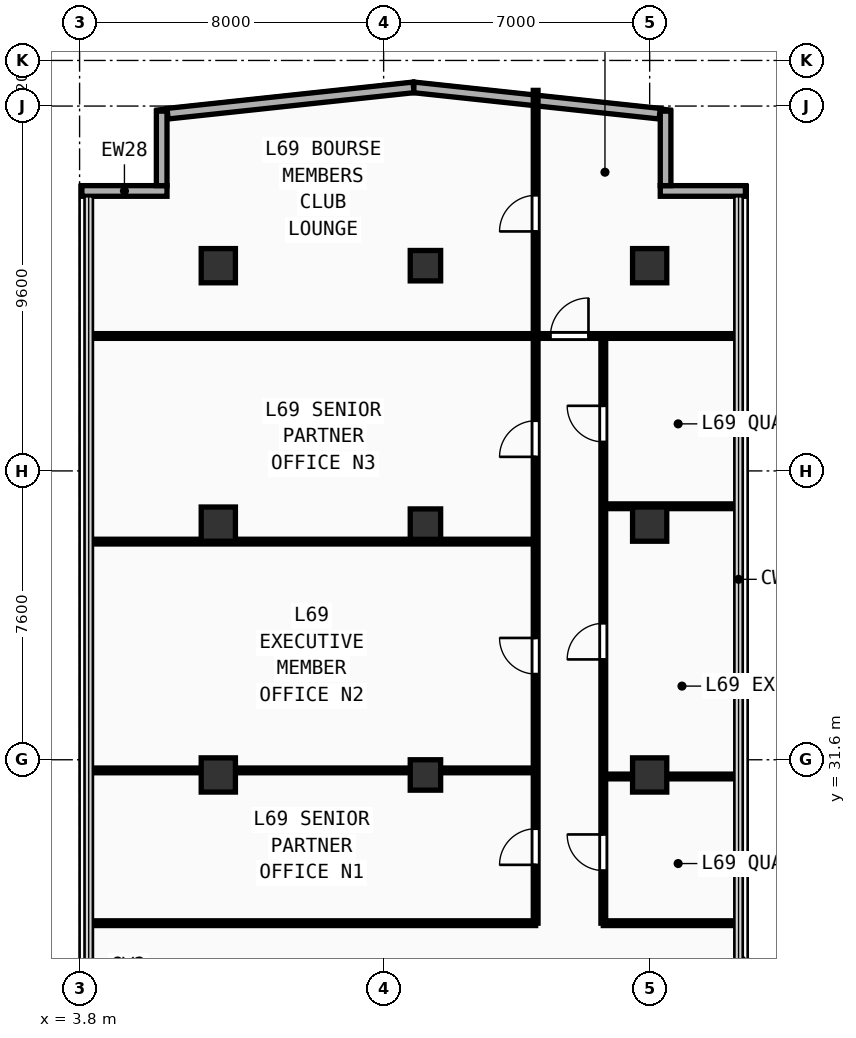
"""IFC4 building model, lengths in metres.
Left out: names, types, materials, properties, quantities, classifications, styles, units other than length and angle.
Written with IfcOpenShell. Run it as: python <this file> out.ifc"""

import sys

from ifc_helpers import new_model, si_unit, direction, frame, frame_2d, origin, origin_2d, place, context, subcontext, project, spatial, rectangle, extrude, element, fill, save


model = new_model("IFC4")
c1 = context("Model", 3, precision=1e-05, world=origin(), true_north=direction((0.0, 1.0)))
c2 = subcontext(c1, "Body", "Model", "MODEL_VIEW")
j1 = project(units=[si_unit("LENGTHUNIT", "METRE"), si_unit("PLANEANGLEUNIT", "RADIAN")], contexts=[c1])
p1 = place(None, origin())
s1 = spatial("IfcSite", under=j1, at=p1, CompositionType="ELEMENT")
p2 = place(p1, origin())
s2 = spatial("IfcBuilding", under=s1, at=p2, CompositionType="ELEMENT")
p3 = place(p2, frame((0.0, 0.0, 270.4)))
s3 = spatial("IfcBuildingStorey", under=s2, at=p3, CompositionType="ELEMENT", Elevation=270.4)
for number, where, z_axis, x_axis in (
    (1, (7.45, 31.2, 0.0), (0.0, 0.0, 1.0), (1.0, 0.0, 0.0)),
    (2, (7.45, 37.8, 0.0), (0.0, 0.0, 1.0), (1.0, 0.0, 0.0)),
    (3, (7.45, 44.6, 0.0), (0.0, 0.0, 1.0), (1.0, 0.0, 0.0)),
    (4, (18.8, 31.2, 0.0), (0.0, 0.0, 1.0), (1.0, 0.0, 0.0)),
    (5, (18.8, 37.8, 0.0), (0.0, 0.0, 1.0), (1.0, 0.0, 0.0)),
    (6, (18.8, 44.6, 0.0), (0.0, 0.0, 1.0), (1.0, 0.0, 0.0)),
):
    element("IfcColumn", number, at=place(p3, frame(where, z_axis=z_axis, x_axis=x_axis)), inside=s3, PredefinedType="COLUMN", context=c2, shape_type="SweptSolid", body=[
        extrude(rectangle(XDim=0.9, YDim=0.9, at=origin_2d()), origin(), (0.0, 0.0, 1.0), 3.56),
    ])
for number, where, z_axis, x_axis in (
    (7, (12.9, 31.2, 0.0), (0.0, 0.0, 1.0), (1.0, 0.0, 0.0)),
    (8, (12.9, 37.8, 0.0), (0.0, 0.0, 1.0), (1.0, 0.0, 0.0)),
    (9, (12.9, 44.6, 0.0), (0.0, 0.0, 1.0), (1.0, 0.0, 0.0)),
):
    element("IfcColumn", number, at=place(p3, frame(where, z_axis=z_axis, x_axis=x_axis)), inside=s3, PredefinedType="COLUMN", context=c2, shape_type="SweptSolid", body=[
        extrude(rectangle(XDim=0.8, YDim=0.8, at=origin_2d()), origin(), (0.0, 0.0, 1.0), 3.56),
    ])
p4 = place(p3, frame((19.079, 46.566, 0.0), z_axis=(0.0, 0.0, 1.0), x_axis=(1.0, 0.0, 0.0)))
e10 = element("IfcWall", 10, at=p4, inside=s3, PredefinedType="SOLIDWALL", context=c2, shape_type="SweptSolid", body=[
    extrude(rectangle(XDim=2.24, YDim=0.28, at=frame_2d((1.12, 0.0))), origin(), (0.0, 0.0, 1.0), 3.56),
])
p5 = place(p3, frame((19.219, 46.706, 0.0), z_axis=(0.0, 0.0, 1.0), x_axis=(0.0, 1.0, 0.0)))
e11 = element("IfcWall", 11, at=p5, inside=s3, PredefinedType="SOLIDWALL", context=c2, shape_type="SweptSolid", body=[
    extrude(rectangle(XDim=1.96, YDim=0.28, at=frame_2d((0.98, 0.0))), origin(), (0.0, 0.0, 1.0), 3.56),
])
p6 = place(p3, frame((3.86, 46.566, 0.0), z_axis=(0.0, 0.0, 1.0), x_axis=(1.0, 0.0, 0.0)))
e12 = element("IfcWall", 12, at=p6, inside=s3, PredefinedType="SOLIDWALL", context=c2, shape_type="SweptSolid", body=[
    extrude(rectangle(XDim=2.24, YDim=0.28, at=frame_2d((1.12, 0.0))), origin(), (0.0, 0.0, 1.0), 3.56),
])
p7 = place(p3, frame((5.96, 46.706, 0.0), z_axis=(0.0, 0.0, 1.0), x_axis=(0.0, 1.0, 0.0)))
e13 = element("IfcWall", 13, at=p7, inside=s3, PredefinedType="SOLIDWALL", context=c2, shape_type="SweptSolid", body=[
    extrude(rectangle(XDim=1.96, YDim=0.28, at=frame_2d((0.98, 0.0))), origin(), (0.0, 0.0, 1.0), 3.56),
])
p8 = place(p3, frame((19.064, 48.599, 0.0), z_axis=(0.0, 0.0, 1.0), x_axis=(-0.994325178593, 0.106383453672, 0.0)))
e14 = element("IfcWall", 14, at=p8, inside=s3, PredefinedType="SOLIDWALL", context=c2, shape_type="SweptSolid", body=[
    extrude(rectangle(XDim=6.508, YDim=0.28, at=frame_2d((3.254, 0.0))), origin(), (0.0, 0.0, 1.0), 3.56),
])
p9 = place(p3, frame((12.586, 49.292, 0.0), z_axis=(0.0, 0.0, 1.0), x_axis=(-0.994324754032, -0.106387421808, 0.0)))
e15 = element("IfcWall", 15, at=p9, inside=s3, PredefinedType="SOLIDWALL", context=c2, shape_type="SweptSolid", body=[
    extrude(rectangle(XDim=6.508, YDim=0.28, at=frame_2d((3.254, 0.0))), origin(), (0.0, 0.0, 1.0), 3.56),
])
p10 = place(p3, frame((4.04, 27.3, 0.0), z_axis=(0.0, 0.0, 1.0), x_axis=(1.0, 0.0, 0.0)))
e16 = element("IfcWall", 16, at=p10, inside=s3, PredefinedType="PARTITIONING", context=c2, shape_type="SweptSolid", body=[
    extrude(rectangle(XDim=11.76, YDim=0.125, at=frame_2d((5.88, 0.0))), origin(), (0.0, 0.0, 1.0), 3.56),
])
p11 = place(p3, frame((15.8, 27.3, 0.0), z_axis=(0.0, 0.0, 1.0), x_axis=(0.0, 1.0, 0.0)))
e17 = element("IfcWall", 17, at=p11, inside=s3, PredefinedType="PARTITIONING", context=c2, shape_type="SweptSolid", body=[
    extrude(rectangle(XDim=15.45, YDim=0.125, at=frame_2d((7.725, 0.0))), origin(), (0.0, 0.0, 1.0), 3.56),
])
p12 = place(p11, frame((1.535, 0.0, 0.0)))
e18 = element("IfcOpeningElement", 18, at=p12, cuts=e17, PredefinedType="OPENING", context=c2, shape_type="SweptSolid", body=[
    extrude(rectangle(XDim=0.95, YDim=2.15, at=frame_2d((0.475, 1.075))), frame((0.0, 0.073, 0.0), z_axis=(0.0, -1.0, 0.0), x_axis=(1.0, 0.0, 0.0)), (0.0, 0.0, 1.0), 0.145),
])
p13 = place(p11, frame((6.555, 0.0, 0.0)))
e19 = element("IfcOpeningElement", 19, at=p13, cuts=e17, PredefinedType="OPENING", context=c2, shape_type="SweptSolid", body=[
    extrude(rectangle(XDim=0.95, YDim=2.15, at=frame_2d((0.475, 1.075))), frame((0.0, 0.073, 0.0), z_axis=(0.0, -1.0, 0.0), x_axis=(1.0, 0.0, 0.0)), (0.0, 0.0, 1.0), 0.145),
])
p14 = place(p11, frame((12.27, 0.0, 0.0)))
e20 = element("IfcOpeningElement", 20, at=p14, cuts=e17, PredefinedType="OPENING", context=c2, shape_type="SweptSolid", body=[
    extrude(rectangle(XDim=0.95, YDim=2.15, at=frame_2d((0.475, 1.075))), frame((0.0, 0.073, 0.0), z_axis=(0.0, -1.0, 0.0), x_axis=(1.0, 0.0, 0.0)), (0.0, 0.0, 1.0), 0.145),
])
p15 = place(p3, frame((4.04, 31.32, 0.0), z_axis=(0.0, 0.0, 1.0), x_axis=(1.0, 0.0, 0.0)))
e21 = element("IfcWall", 21, at=p15, inside=s3, PredefinedType="PARTITIONING", context=c2, shape_type="SweptSolid", body=[
    extrude(rectangle(XDim=11.76, YDim=0.125, at=frame_2d((5.88, 0.0))), origin(), (0.0, 0.0, 1.0), 2.798),
])
p16 = place(p3, frame((4.04, 37.34, 0.0), z_axis=(0.0, 0.0, 1.0), x_axis=(1.0, 0.0, 0.0)))
e22 = element("IfcWall", 22, at=p16, inside=s3, PredefinedType="PARTITIONING", context=c2, shape_type="SweptSolid", body=[
    extrude(rectangle(XDim=11.76, YDim=0.125, at=frame_2d((5.88, 0.0))), origin(), (0.0, 0.0, 1.0), 3.56),
])
p17 = place(p3, frame((4.04, 42.75, 0.0), z_axis=(0.0, 0.0, 1.0), x_axis=(1.0, 0.0, 0.0)))
e23 = element("IfcWall", 23, at=p17, inside=s3, PredefinedType="PARTITIONING", context=c2, shape_type="SweptSolid", body=[
    extrude(rectangle(XDim=17.12, YDim=0.125, at=frame_2d((8.56, 0.0))), origin(), (0.0, 0.0, 1.0), 3.26),
])
p18 = place(p17, frame((12.15, 0.0, 0.0)))
e24 = element("IfcOpeningElement", 24, at=p18, cuts=e23, PredefinedType="OPENING", context=c2, shape_type="SweptSolid", body=[
    extrude(rectangle(XDim=1.0, YDim=2.2, at=frame_2d((0.5, 1.1))), frame((0.0, 0.073, 0.0), z_axis=(0.0, -1.0, 0.0), x_axis=(1.0, 0.0, 0.0)), (0.0, 0.0, 1.0), 0.145),
])
p19 = place(p3, frame((15.8, 42.75, 0.0), z_axis=(0.0, 0.0, 1.0), x_axis=(0.0, 1.0, 0.0)))
e25 = element("IfcWall", 25, at=p19, inside=s3, PredefinedType="PARTITIONING", context=c2, shape_type="SweptSolid", body=[
    extrude(rectangle(XDim=6.463, YDim=0.125, at=frame_2d((3.231, 0.0))), origin(), (0.0, 0.0, 1.0), 3.56),
])
p20 = place(p19, frame((2.751, 0.0, 0.0)))
e26 = element("IfcOpeningElement", 26, at=p20, cuts=e25, PredefinedType="OPENING", context=c2, shape_type="SweptSolid", body=[
    extrude(rectangle(XDim=0.95, YDim=2.15, at=frame_2d((0.475, 1.075))), frame((0.0, 0.073, 0.0), z_axis=(0.0, -1.0, 0.0), x_axis=(1.0, 0.0, 0.0)), (0.0, 0.0, 1.0), 0.145),
])
p21 = place(p3, frame((17.58, 27.3, 0.0), z_axis=(0.0, 0.0, 1.0), x_axis=(1.0, 0.0, 0.0)))
e27 = element("IfcWall", 27, at=p21, inside=s3, PredefinedType="PARTITIONING", context=c2, shape_type="SweptSolid", body=[
    extrude(rectangle(XDim=3.58, YDim=0.125, at=frame_2d((1.79, 0.0))), origin(), (0.0, 0.0, 1.0), 3.56),
])
p22 = place(p3, frame((17.58, 27.3, 0.0), z_axis=(0.0, 0.0, 1.0), x_axis=(0.0, 1.0, 0.0)))
e28 = element("IfcWall", 28, at=p22, inside=s3, PredefinedType="PARTITIONING", context=c2, shape_type="SweptSolid", body=[
    extrude(rectangle(XDim=15.45, YDim=0.125, at=frame_2d((7.725, 0.0))), origin(), (0.0, 0.0, 1.0), 3.56),
])
p23 = place(p22, frame((1.385, 0.0, 0.0)))
e29 = element("IfcOpeningElement", 29, at=p23, cuts=e28, PredefinedType="OPENING", context=c2, shape_type="SweptSolid", body=[
    extrude(rectangle(XDim=0.95, YDim=2.15, at=frame_2d((0.475, 1.075))), frame((0.0, 0.073, 0.0), z_axis=(0.0, -1.0, 0.0), x_axis=(1.0, 0.0, 0.0)), (0.0, 0.0, 1.0), 0.145),
])
p24 = place(p22, frame((6.94, 0.0, 0.0)))
e30 = element("IfcOpeningElement", 30, at=p24, cuts=e28, PredefinedType="OPENING", context=c2, shape_type="SweptSolid", body=[
    extrude(rectangle(XDim=0.95, YDim=2.15, at=frame_2d((0.475, 1.075))), frame((0.0, 0.073, 0.0), z_axis=(0.0, -1.0, 0.0), x_axis=(1.0, 0.0, 0.0)), (0.0, 0.0, 1.0), 0.145),
])
p25 = place(p22, frame((12.663, 0.0, 0.0)))
e31 = element("IfcOpeningElement", 31, at=p25, cuts=e28, PredefinedType="OPENING", context=c2, shape_type="SweptSolid", body=[
    extrude(rectangle(XDim=0.95, YDim=2.15, at=frame_2d((0.475, 1.075))), frame((0.0, 0.073, 0.0), z_axis=(0.0, -1.0, 0.0), x_axis=(1.0, 0.0, 0.0)), (0.0, 0.0, 1.0), 0.145),
])
p26 = place(p3, frame((17.58, 31.16, 0.0), z_axis=(0.0, 0.0, 1.0), x_axis=(1.0, 0.0, 0.0)))
e32 = element("IfcWall", 32, at=p26, inside=s3, PredefinedType="PARTITIONING", context=c2, shape_type="SweptSolid", body=[
    extrude(rectangle(XDim=3.58, YDim=0.125, at=frame_2d((1.79, 0.0))), origin(), (0.0, 0.0, 1.0), 2.798),
])
p27 = place(p3, frame((17.58, 38.27, 0.0), z_axis=(0.0, 0.0, 1.0), x_axis=(1.0, 0.0, 0.0)))
e33 = element("IfcWall", 33, at=p27, inside=s3, PredefinedType="PARTITIONING", context=c2, shape_type="SweptSolid", body=[
    extrude(rectangle(XDim=3.58, YDim=0.125, at=frame_2d((1.79, 0.0))), origin(), (0.0, 0.0, 1.0), 3.56),
])
p28 = place(p12, origin())
e34 = element("IfcDoor", 34, at=p28, inside=s3, OperationType="SINGLE_SWING_LEFT", PredefinedType="DOOR", context=c2, shape_type="SweptSolid", body=[
    extrude(rectangle(XDim=0.95, YDim=2.15, at=frame_2d((0.475, 1.075))), frame((0.0, 0.025, 0.0), z_axis=(0.0, -1.0, 0.0), x_axis=(1.0, 0.0, 0.0)), (0.0, 0.0, 1.0), 0.05),
])
fill(e18, e34)
p29 = place(p13, origin())
e35 = element("IfcDoor", 35, at=p29, inside=s3, OperationType="SINGLE_SWING_RIGHT", PredefinedType="DOOR", context=c2, shape_type="SweptSolid", body=[
    extrude(rectangle(XDim=0.95, YDim=2.15, at=frame_2d((0.475, 1.075))), frame((0.0, 0.025, 0.0), z_axis=(0.0, -1.0, 0.0), x_axis=(1.0, 0.0, 0.0)), (0.0, 0.0, 1.0), 0.05),
])
fill(e19, e35)
p30 = place(p14, origin())
e36 = element("IfcDoor", 36, at=p30, inside=s3, OperationType="SINGLE_SWING_LEFT", PredefinedType="DOOR", context=c2, shape_type="SweptSolid", body=[
    extrude(rectangle(XDim=0.95, YDim=2.15, at=frame_2d((0.475, 1.075))), frame((0.0, 0.025, 0.0), z_axis=(0.0, -1.0, 0.0), x_axis=(1.0, 0.0, 0.0)), (0.0, 0.0, 1.0), 0.05),
])
fill(e20, e36)
p31 = place(p18, origin())
e37 = element("IfcDoor", 37, at=p31, inside=s3, OperationType="SINGLE_SWING_RIGHT", PredefinedType="DOOR", context=c2, shape_type="SweptSolid", body=[
    extrude(rectangle(XDim=1.0, YDim=2.2, at=frame_2d((0.5, 1.1))), frame((0.0, 0.025, 0.0), z_axis=(0.0, -1.0, 0.0), x_axis=(1.0, 0.0, 0.0)), (0.0, 0.0, 1.0), 0.05),
])
fill(e24, e37)
p32 = place(p20, origin())
e38 = element("IfcDoor", 38, at=p32, inside=s3, OperationType="SINGLE_SWING_LEFT", PredefinedType="DOOR", context=c2, shape_type="SweptSolid", body=[
    extrude(rectangle(XDim=0.95, YDim=2.15, at=frame_2d((0.475, 1.075))), frame((0.0, 0.025, 0.0), z_axis=(0.0, -1.0, 0.0), x_axis=(1.0, 0.0, 0.0)), (0.0, 0.0, 1.0), 0.05),
])
fill(e26, e38)
p33 = place(p23, origin())
e39 = element("IfcDoor", 39, at=p33, inside=s3, OperationType="SINGLE_SWING_RIGHT", PredefinedType="DOOR", context=c2, shape_type="SweptSolid", body=[
    extrude(rectangle(XDim=0.95, YDim=2.15, at=frame_2d((0.475, 1.075))), frame((0.0, 0.025, 0.0), z_axis=(0.0, -1.0, 0.0), x_axis=(1.0, 0.0, 0.0)), (0.0, 0.0, 1.0), 0.05),
])
fill(e29, e39)
p34 = place(p24, origin())
e40 = element("IfcDoor", 40, at=p34, inside=s3, OperationType="SINGLE_SWING_LEFT", PredefinedType="DOOR", context=c2, shape_type="SweptSolid", body=[
    extrude(rectangle(XDim=0.95, YDim=2.15, at=frame_2d((0.475, 1.075))), frame((0.0, 0.025, 0.0), z_axis=(0.0, -1.0, 0.0), x_axis=(1.0, 0.0, 0.0)), (0.0, 0.0, 1.0), 0.05),
])
fill(e30, e40)
p35 = place(p25, origin())
e41 = element("IfcDoor", 41, at=p35, inside=s3, OperationType="SINGLE_SWING_RIGHT", PredefinedType="DOOR", context=c2, shape_type="SweptSolid", body=[
    extrude(rectangle(XDim=0.95, YDim=2.15, at=frame_2d((0.475, 1.075))), frame((0.0, 0.025, 0.0), z_axis=(0.0, -1.0, 0.0), x_axis=(1.0, 0.0, 0.0)), (0.0, 0.0, 1.0), 0.05),
])
fill(e31, e41)
save(model, sys.argv[1])
